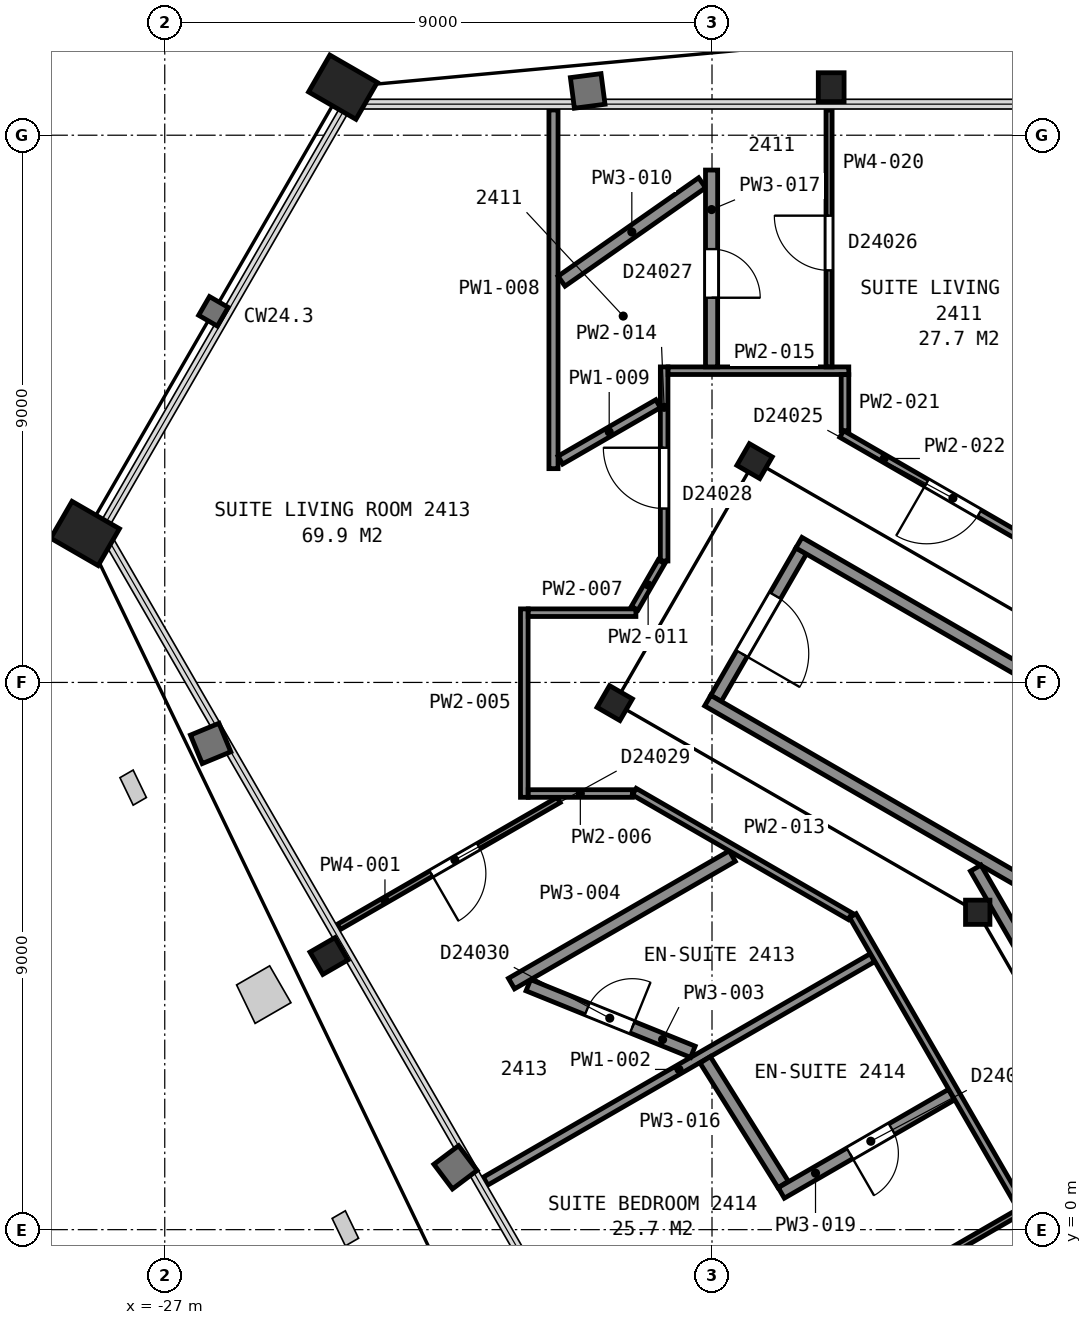
"""IFC4 building model, lengths in metres.
Left out: names, types, materials, properties, quantities, classifications, styles, units other than length and angle.
Written with IfcOpenShell. Run it as: python <this file> out.ifc"""

import sys

from ifc_helpers import new_model, si_unit, direction, frame, frame_2d, origin, origin_2d, place, context, subcontext, project, spatial, rectangle, hollow_rectangle, i_section, extrude, element, fill, save


model = new_model("IFC4")
c1 = context("Model", 3, precision=1e-05, world=origin(), true_north=direction((0.0, 1.0)))
c2 = subcontext(c1, "Body", "Model", "MODEL_VIEW")
j1 = project(units=[si_unit("LENGTHUNIT", "METRE"), si_unit("PLANEANGLEUNIT", "RADIAN")], contexts=[c1])
p1 = place(None, origin())
s1 = spatial("IfcSite", under=j1, at=p1, CompositionType="ELEMENT")
p2 = place(p1, origin())
s2 = spatial("IfcBuilding", under=s1, at=p2, CompositionType="ELEMENT")
p3 = place(p2, frame((0.0, 0.0, 103.6)))
s3 = spatial("IfcBuildingStorey", under=s2, at=p3, CompositionType="ELEMENT", Elevation=103.6)
p4 = place(p3, frame((-16.04, 18.79, 0.045), z_axis=(0.0, 0.0, 1.0), x_axis=(1.0, 0.0, 0.0)))
e1 = element("IfcColumn", 1, at=p4, inside=s3, PredefinedType="COLUMN", context=c2, shape_type="SweptSolid", body=[
    extrude(i_section(OverallWidth=0.424, OverallDepth=0.475, WebThickness=0.048, FlangeThickness=0.077, FilletRadius=0.015, at=origin_2d()), origin(), (0.0, 0.0, 1.0), 3.555),
])
for number, where, z_axis, x_axis in (
    (2, (-24.07, 18.79, 0.075), (0.0, 0.0, 1.0), (0.5, 0.866, 0.0)),
    (3, (-28.31, 11.45, 0.075), (0.0, 0.0, 1.0), (0.5, 0.866, 0.0)),
):
    element("IfcColumn", number, at=place(p3, frame(where, z_axis=z_axis, x_axis=x_axis)), inside=s3, PredefinedType="COLUMN", context=c2, shape_type="SweptSolid", body=[
        extrude(hollow_rectangle(XDim=0.7, YDim=0.9, WallThickness=0.065, at=origin_2d()), origin(), (0.0, 0.0, 1.0), 3.525),
    ])
p5 = place(p3, frame((-24.3, 4.5, 0.045), z_axis=(0.0, 0.0, 1.0), x_axis=(-0.5, 0.866025403784, 0.0)))
e4 = element("IfcColumn", 4, at=p5, inside=s3, PredefinedType="COLUMN", context=c2, shape_type="SweptSolid", body=[
    extrude(i_section(OverallWidth=0.424, OverallDepth=0.475, WebThickness=0.048, FlangeThickness=0.077, FilletRadius=0.015, at=origin_2d()), origin(), (0.0, 0.0, 1.0), 3.555),
])
for number, where, z_axis, x_axis in (
    (5, (-17.3, 12.64, 0.0), (0.0, 0.0, 1.0), (0.5, 0.866, 0.0)),
    (6, (-19.6, 8.66, 0.0), (0.0, 0.0, 1.0), (0.5, 0.866, 0.0)),
):
    element("IfcColumn", number, at=place(p3, frame(where, z_axis=z_axis, x_axis=x_axis)), inside=s3, PredefinedType="COLUMN", context=c2, shape_type="SweptSolid", body=[
        extrude(i_section(OverallWidth=0.411, OverallDepth=0.434, WebThickness=0.036, FlangeThickness=0.057, FilletRadius=0.015, at=origin_2d()), origin(), (0.0, 0.0, 1.0), 3.6),
    ])
p6 = place(p3, frame((-13.63, 5.22, 0.0), z_axis=(0.0, 0.0, 1.0), x_axis=(1.0, 0.0, 0.0)))
e7 = element("IfcColumn", 7, at=p6, inside=s3, PredefinedType="COLUMN", context=c2, shape_type="SweptSolid", body=[
    extrude(i_section(OverallWidth=0.401, OverallDepth=0.399, WebThickness=0.025, FlangeThickness=0.04, FilletRadius=0.015, at=origin_2d()), origin(), (0.0, 0.0, 1.0), 3.6),
])
p7 = place(p3, frame((-16.534, 11.162, 0.0), z_axis=(0.0, 0.0, 1.0), x_axis=(-0.49998411664, -0.866034573852, 0.0)))
e8 = element("IfcWall", 8, at=p7, inside=s3, PredefinedType="PARTITIONING", context=c2, shape_type="SweptSolid", body=[
    extrude(rectangle(XDim=2.8, YDim=0.2, at=frame_2d((1.4, 0.0))), origin(), (0.0, 0.0, 1.0), 3.35),
])
p8 = place(p7, frame((0.85, 0.0, 0.0)))
e9 = element("IfcOpeningElement", 9, at=p8, cuts=e8, PredefinedType="OPENING", context=c2, shape_type="SweptSolid", body=[
    extrude(rectangle(XDim=1.1, YDim=2.1, at=frame_2d((0.55, 1.05))), frame((0.0, 0.11, 0.0), z_axis=(0.0, -1.0, 0.0), x_axis=(1.0, 0.0, 0.0)), (0.0, 0.0, 1.0), 0.22),
])
for number, where, z_axis, x_axis in (
    (10, (-7.678, 2.701, 0.0), (0.0, 0.0, 1.0), (-0.866, 0.5, 0.0)),
    (11, (-6.178, 5.299, 0.0), (0.0, 0.0, 1.0), (-0.866, 0.5, 0.0)),
):
    element("IfcWall", number, at=place(p3, frame(where, z_axis=z_axis, x_axis=x_axis)), inside=s3, PredefinedType="PARTITIONING", context=c2, shape_type="SweptSolid", body=[
        extrude(rectangle(XDim=12.0, YDim=0.2, at=frame_2d((6.0, 0.0))), origin(), (0.0, 0.0, 1.0), 3.35),
    ])
p9 = place(p3, frame((-13.664, 5.946, 0.0), z_axis=(0.0, 0.0, 1.0), x_axis=(0.499994327219, -0.866028678941, 0.0)))
e12 = element("IfcWall", 12, at=p9, inside=s3, PredefinedType="PARTITIONING", context=c2, shape_type="SweptSolid", body=[
    extrude(rectangle(XDim=23.968, YDim=0.2, at=frame_2d((11.984, 0.0))), origin(), (0.0, 0.0, 1.0), 3.35),
])
p10 = place(p3, frame((-20.521, 7.067, 0.0), z_axis=(0.0, 0.0, 1.0), x_axis=(-0.866025950195, -0.499999053588, 0.0)))
e13 = element("IfcWall", 13, at=p10, inside=s3, PredefinedType="PARTITIONING", context=c2, shape_type="SweptSolid", body=[
    extrude(rectangle(XDim=4.177, YDim=0.1, at=frame_2d((2.088, 0.0))), origin(), (0.0, 0.0, 1.0), 2.613),
])
p11 = place(p10, frame((1.522, 0.0, 0.0)))
e14 = element("IfcOpeningElement", 14, at=p11, cuts=e13, PredefinedType="OPENING", context=c2, shape_type="SweptSolid", body=[
    extrude(rectangle(XDim=0.9, YDim=2.1, at=frame_2d((0.45, 1.05))), frame((0.0, 0.06, 0.0), z_axis=(0.0, -1.0, 0.0), x_axis=(1.0, 0.0, 0.0)), (0.0, 0.0, 1.0), 0.12),
])
p12 = place(p3, frame((-21.725, 0.798, 0.0), z_axis=(0.0, 0.0, 1.0), x_axis=(0.866003534372, 0.50003787702, 0.0)))
e15 = element("IfcWall", 15, at=p12, inside=s3, PredefinedType="PARTITIONING", context=c2, shape_type="SweptSolid", body=[
    extrude(rectangle(XDim=7.348, YDim=0.15, at=frame_2d((3.674, 0.0))), origin(), (0.0, 0.0, 1.0), 2.613),
])
p13 = place(p3, frame((-21.021, 4.02, 0.0), z_axis=(0.0, 0.0, 1.0), x_axis=(0.927010502524, -0.375035369278, 0.0)))
e16 = element("IfcWall", 16, at=p13, inside=s3, PredefinedType="PARTITIONING", context=c2, shape_type="SweptSolid", body=[
    extrude(rectangle(XDim=2.92, YDim=0.2, at=frame_2d((1.46, 0.0))), origin(), (0.0, 0.0, 1.0), 2.613),
])
p14 = place(p13, frame((1.045, 0.0, 0.0)))
e17 = element("IfcOpeningElement", 17, at=p14, cuts=e16, PredefinedType="OPENING", context=c2, shape_type="SweptSolid", body=[
    extrude(rectangle(XDim=0.8, YDim=2.1, at=frame_2d((0.4, 1.05))), frame((0.0, 0.11, 0.0), z_axis=(0.0, -1.0, 0.0), x_axis=(1.0, 0.0, 0.0)), (0.0, 0.0, 1.0), 0.22),
])
p15 = place(p3, frame((-21.298, 4.047, 0.0), z_axis=(0.0, 0.0, 1.0), x_axis=(0.865948008923, 0.500134027879, 0.0)))
e18 = element("IfcWall", 18, at=p15, inside=s3, PredefinedType="PARTITIONING", context=c2, shape_type="SweptSolid", body=[
    extrude(rectangle(XDim=4.193, YDim=0.2, at=frame_2d((2.097, 0.0))), origin(), (0.0, 0.0, 1.0), 2.613),
])
p16 = place(p3, frame((-21.087, 7.111, 0.0), z_axis=(0.0, 0.0, 1.0), x_axis=(0.0, 1.0, 0.0)))
e19 = element("IfcWall", 19, at=p16, inside=s3, PredefinedType="PARTITIONING", context=c2, shape_type="SweptSolid", body=[
    extrude(rectangle(XDim=3.099, YDim=0.125, at=frame_2d((1.549, 0.0))), origin(), (0.0, 0.0, 1.0), 2.613),
])
p17 = place(p3, frame((-21.022, 7.173, 0.0), z_axis=(0.0, 0.0, 1.0), x_axis=(1.0, 0.0, 0.0)))
e20 = element("IfcWall", 20, at=p17, inside=s3, PredefinedType="PARTITIONING", context=c2, shape_type="SweptSolid", body=[
    extrude(rectangle(XDim=1.713, YDim=0.125, at=frame_2d((0.856, 0.0))), origin(), (0.0, 0.0, 1.0), 2.613),
])
p18 = place(p3, frame((-21.022, 10.147, 0.0), z_axis=(0.0, 0.0, 1.0), x_axis=(1.0, 0.0, 0.0)))
e21 = element("IfcWall", 21, at=p18, inside=s3, PredefinedType="PARTITIONING", context=c2, shape_type="SweptSolid", body=[
    extrude(rectangle(XDim=1.771, YDim=0.125, at=frame_2d((0.885, 0.0))), origin(), (0.0, 0.0, 1.0), 2.613),
])
p19 = place(p3, frame((-20.607, 12.516, 0.0), z_axis=(0.0, 0.0, 1.0), x_axis=(0.0, 1.0, 0.0)))
e22 = element("IfcWall", 22, at=p19, inside=s3, PredefinedType="PARTITIONING", context=c2, shape_type="SweptSolid", body=[
    extrude(rectangle(XDim=5.899, YDim=0.15, at=frame_2d((2.949, 0.0))), origin(), (0.0, 0.0, 1.0), 2.613),
])
p20 = place(p3, frame((-20.494, 12.656, 0.0), z_axis=(0.0, 0.0, 1.0), x_axis=(0.865984062371, 0.500071598593, 0.0)))
e23 = element("IfcWall", 23, at=p20, inside=s3, PredefinedType="PARTITIONING", context=c2, shape_type="SweptSolid", body=[
    extrude(rectangle(XDim=1.856, YDim=0.15, at=frame_2d((0.928, 0.0))), origin(), (0.0, 0.0, 1.0), 2.613),
])
p21 = place(p3, frame((-20.475, 15.6, 0.0), z_axis=(0.0, 0.0, 1.0), x_axis=(0.819231920519, 0.573462344363, 0.0)))
e24 = element("IfcWall", 24, at=p21, inside=s3, PredefinedType="PARTITIONING", context=c2, shape_type="SweptSolid", body=[
    extrude(rectangle(XDim=2.822, YDim=0.2, at=frame_2d((1.411, 0.0))), origin(), (0.0, 0.0, 1.0), 2.613),
])
p22 = place(p3, frame((-19.271, 10.221, 0.0), z_axis=(0.0, 0.0, 1.0), x_axis=(0.499881837328, 0.866093614288, 0.0)))
e25 = element("IfcWall", 25, at=p22, inside=s3, PredefinedType="PARTITIONING", context=c2, shape_type="SweptSolid", body=[
    extrude(rectangle(XDim=0.884, YDim=0.125, at=frame_2d((0.442, 0.0))), origin(), (0.0, 0.0, 1.0), 2.613),
])
p23 = place(p3, frame((-19.311, -3.382, 0.0), z_axis=(0.0, 0.0, 1.0), x_axis=(0.865995225926, 0.500052265941, 0.0)))
e26 = element("IfcWall", 26, at=p23, inside=s3, PredefinedType="PARTITIONING", context=c2, shape_type="SweptSolid", body=[
    extrude(rectangle(XDim=7.347, YDim=0.1, at=frame_2d((3.674, 0.0))), origin(), (0.0, 0.0, 1.0), 2.613),
])
p24 = place(p23, frame((3.303, 0.0, 0.0)))
e27 = element("IfcOpeningElement", 27, at=p24, cuts=e26, PredefinedType="OPENING", context=c2, shape_type="SweptSolid", body=[
    extrude(rectangle(XDim=0.9, YDim=2.1, at=frame_2d((0.45, 1.05))), frame((0.0, 0.06, 0.0), z_axis=(0.0, -1.0, 0.0), x_axis=(1.0, 0.0, 0.0)), (0.0, 0.0, 1.0), 0.12),
])
p25 = place(p3, frame((-19.278, 7.204, 0.0), z_axis=(0.0, 0.0, 1.0), x_axis=(0.865992261418, -0.50005739987, 0.0)))
e28 = element("IfcWall", 28, at=p25, inside=s3, PredefinedType="PARTITIONING", context=c2, shape_type="SweptSolid", body=[
    extrude(rectangle(XDim=4.101, YDim=0.125, at=frame_2d((2.051, 0.0))), origin(), (0.0, 0.0, 1.0), 2.613),
])
p26 = place(p3, frame((-18.787, 10.998, 0.0), z_axis=(0.0, 0.0, 1.0), x_axis=(0.0, 1.0, 0.0)))
e29 = element("IfcWall", 29, at=p26, inside=s3, PredefinedType="PARTITIONING", context=c2, shape_type="SweptSolid", body=[
    extrude(rectangle(XDim=3.192, YDim=0.125, at=frame_2d((1.596, 0.0))), origin(), (0.0, 0.0, 1.0), 2.613),
])
p27 = place(p26, frame((0.863, 0.0, 0.0)))
e30 = element("IfcOpeningElement", 30, at=p27, cuts=e29, PredefinedType="OPENING", context=c2, shape_type="SweptSolid", body=[
    extrude(rectangle(XDim=1.0, YDim=2.1, at=frame_2d((0.5, 1.05))), frame((0.0, 0.073, 0.0), z_axis=(0.0, -1.0, 0.0), x_axis=(1.0, 0.0, 0.0)), (0.0, 0.0, 1.0), 0.145),
])
p28 = place(p3, frame((-18.722, 14.127, 0.0), z_axis=(0.0, 0.0, 1.0), x_axis=(1.0, 0.0, 0.0)))
e31 = element("IfcWall", 31, at=p28, inside=s3, PredefinedType="PARTITIONING", context=c2, shape_type="SweptSolid", body=[
    extrude(rectangle(XDim=2.971, YDim=0.125, at=frame_2d((1.486, 0.0))), origin(), (0.0, 0.0, 1.0), 2.613),
])
p29 = place(p3, frame((-18.112, 2.793, 0.0), z_axis=(0.0, 0.0, 1.0), x_axis=(0.530334606404, -0.847788420097, 0.0)))
e32 = element("IfcWall", 32, at=p29, inside=s3, PredefinedType="PARTITIONING", context=c2, shape_type="SweptSolid", body=[
    extrude(rectangle(XDim=2.419, YDim=0.2, at=frame_2d((1.209, 0.0))), origin(), (0.0, 0.0, 1.0), 2.613),
])
p30 = place(p3, frame((-18.007, 14.189, 0.0), z_axis=(0.0, 0.0, 1.0), x_axis=(0.0, 1.0, 0.0)))
e33 = element("IfcWall", 33, at=p30, inside=s3, PredefinedType="PARTITIONING", context=c2, shape_type="SweptSolid", body=[
    extrude(rectangle(XDim=3.238, YDim=0.2, at=frame_2d((1.619, 0.0))), origin(), (0.0, 0.0, 1.0), 2.613),
])
p31 = place(p30, frame((1.137, 0.0, 0.0)))
e34 = element("IfcOpeningElement", 34, at=p31, cuts=e33, PredefinedType="OPENING", context=c2, shape_type="SweptSolid", body=[
    extrude(rectangle(XDim=0.8, YDim=2.1, at=frame_2d((0.4, 1.05))), frame((0.0, 0.11, 0.0), z_axis=(0.0, -1.0, 0.0), x_axis=(1.0, 0.0, 0.0)), (0.0, 0.0, 1.0), 0.22),
])
p32 = place(p3, frame((-16.861, 0.604, 0.0), z_axis=(0.0, 0.0, 1.0), x_axis=(0.866003189247, 0.500038474733, 0.0)))
e35 = element("IfcWall", 35, at=p32, inside=s3, PredefinedType="PARTITIONING", context=c2, shape_type="SweptSolid", body=[
    extrude(rectangle(XDim=3.232, YDim=0.2, at=frame_2d((1.616, 0.0))), origin(), (0.0, 0.0, 1.0), 2.613),
])
p33 = place(p32, frame((1.3, 0.0, 0.0)))
e36 = element("IfcOpeningElement", 36, at=p33, cuts=e35, PredefinedType="OPENING", context=c2, shape_type="SweptSolid", body=[
    extrude(rectangle(XDim=0.8, YDim=2.1, at=frame_2d((0.4, 1.05))), frame((0.0, 0.11, 0.0), z_axis=(0.0, -1.0, 0.0), x_axis=(1.0, 0.0, 0.0)), (0.0, 0.0, 1.0), 0.22),
])
p34 = place(p3, frame((-16.075, 14.189, 0.0), z_axis=(0.0, 0.0, 1.0), x_axis=(0.0, 1.0, 0.0)))
e37 = element("IfcWall", 37, at=p34, inside=s3, PredefinedType="PARTITIONING", context=c2, shape_type="SweptSolid", body=[
    extrude(rectangle(XDim=4.226, YDim=0.1, at=frame_2d((2.113, 0.0))), origin(), (0.0, 0.0, 1.0), 2.613),
])
p35 = place(p34, frame((1.587, 0.0, 0.0)))
e38 = element("IfcOpeningElement", 38, at=p35, cuts=e37, PredefinedType="OPENING", context=c2, shape_type="SweptSolid", body=[
    extrude(rectangle(XDim=0.9, YDim=2.1, at=frame_2d((0.45, 1.05))), frame((0.0, 0.06, 0.0), z_axis=(0.0, -1.0, 0.0), x_axis=(1.0, 0.0, 0.0)), (0.0, 0.0, 1.0), 0.12),
])
p36 = place(p3, frame((-15.813, 13.14, 0.0), z_axis=(0.0, 0.0, 1.0), x_axis=(0.0, 1.0, 0.0)))
e39 = element("IfcWall", 39, at=p36, inside=s3, PredefinedType="PARTITIONING", context=c2, shape_type="SweptSolid", body=[
    extrude(rectangle(XDim=0.922, YDim=0.125, at=frame_2d((0.461, 0.0))), origin(), (0.0, 0.0, 1.0), 2.613),
])
p37 = place(p3, frame((-15.867, 13.086, 0.0), z_axis=(0.0, 0.0, 1.0), x_axis=(0.866070231021, -0.499922348909, 0.0)))
e40 = element("IfcWall", 40, at=p37, inside=s3, PredefinedType="PARTITIONING", context=c2, shape_type="SweptSolid", body=[
    extrude(rectangle(XDim=4.088, YDim=0.125, at=frame_2d((2.044, 0.0))), origin(), (0.0, 0.0, 1.0), 2.613),
])
p38 = place(p37, frame((1.613, 0.0, 0.0)))
e41 = element("IfcOpeningElement", 41, at=p38, cuts=e40, PredefinedType="OPENING", context=c2, shape_type="SweptSolid", body=[
    extrude(rectangle(XDim=1.0, YDim=2.1, at=frame_2d((0.5, 1.05))), frame((0.0, 0.073, 0.0), z_axis=(0.0, -1.0, 0.0), x_axis=(1.0, 0.0, 0.0)), (0.0, 0.0, 1.0), 0.145),
])
p39 = place(p3, frame((-3.756, -15.494, 0.0), z_axis=(0.0, 0.0, 1.0), x_axis=(-0.500027787016, 0.866009360349, 0.0)))
e42 = element("IfcWall", 42, at=p39, inside=s3, PredefinedType="PARTITIONING", context=c2, shape_type="SweptSolid", body=[
    extrude(rectangle(XDim=23.856, YDim=0.125, at=frame_2d((11.928, 0.0))), origin(), (0.0, 0.0, 1.0), 2.613),
])
p40 = place(p39, frame((15.368, 0.0, 0.0)))
e43 = element("IfcOpeningElement", 43, at=p40, cuts=e42, PredefinedType="OPENING", context=c2, shape_type="SweptSolid", body=[
    extrude(rectangle(XDim=1.0, YDim=2.1, at=frame_2d((0.5, 1.05))), frame((0.0, 0.073, 0.0), z_axis=(0.0, -1.0, 0.0), x_axis=(1.0, 0.0, 0.0)), (0.0, 0.0, 1.0), 0.145),
])
p41 = place(p39, frame((10.54, 0.0, 0.0)))
e44 = element("IfcOpeningElement", 44, at=p41, cuts=e42, PredefinedType="OPENING", context=c2, shape_type="SweptSolid", body=[
    extrude(rectangle(XDim=1.0, YDim=2.1, at=frame_2d((0.5, 1.05))), frame((0.0, 0.073, 0.0), z_axis=(0.0, -1.0, 0.0), x_axis=(1.0, 0.0, 0.0)), (0.0, 0.0, 1.0), 0.145),
])
p42 = place(p8, origin())
e45 = element("IfcDoor", 45, at=p42, inside=s3, OperationType="SINGLE_SWING_RIGHT", PredefinedType="DOOR", context=c2, shape_type="SweptSolid", body=[
    extrude(rectangle(XDim=1.1, YDim=2.1, at=frame_2d((0.55, 1.05))), frame((0.0, 0.025, 0.0), z_axis=(0.0, -1.0, 0.0), x_axis=(1.0, 0.0, 0.0)), (0.0, 0.0, 1.0), 0.05),
])
fill(e9, e45)
p43 = place(p11, origin())
e46 = element("IfcDoor", 46, at=p43, inside=s3, OperationType="SINGLE_SWING_RIGHT", PredefinedType="DOOR", context=c2, shape_type="SweptSolid", body=[
    extrude(rectangle(XDim=0.9, YDim=2.1, at=frame_2d((0.45, 1.05))), frame((0.0, 0.025, 0.0), z_axis=(0.0, -1.0, 0.0), x_axis=(1.0, 0.0, 0.0)), (0.0, 0.0, 1.0), 0.05),
])
fill(e14, e46)
p44 = place(p14, origin())
e47 = element("IfcDoor", 47, at=p44, inside=s3, OperationType="SINGLE_SWING_RIGHT", PredefinedType="DOOR", context=c2, shape_type="SweptSolid", body=[
    extrude(rectangle(XDim=0.8, YDim=2.1, at=frame_2d((0.4, 1.05))), frame((0.0, 0.025, 0.0), z_axis=(0.0, -1.0, 0.0), x_axis=(1.0, 0.0, 0.0)), (0.0, 0.0, 1.0), 0.05),
])
fill(e17, e47)
p45 = place(p27, origin())
e48 = element("IfcDoor", 48, at=p45, inside=s3, OperationType="SINGLE_SWING_RIGHT", PredefinedType="DOOR", context=c2, shape_type="SweptSolid", body=[
    extrude(rectangle(XDim=1.0, YDim=2.1, at=frame_2d((0.5, 1.05))), frame((0.0, 0.025, 0.0), z_axis=(0.0, -1.0, 0.0), x_axis=(1.0, 0.0, 0.0)), (0.0, 0.0, 1.0), 0.05),
])
fill(e30, e48)
p46 = place(p31, origin())
e49 = element("IfcDoor", 49, at=p46, inside=s3, OperationType="SINGLE_SWING_LEFT", PredefinedType="DOOR", context=c2, shape_type="SweptSolid", body=[
    extrude(rectangle(XDim=0.8, YDim=2.1, at=frame_2d((0.4, 1.05))), frame((0.0, 0.025, 0.0), z_axis=(0.0, -1.0, 0.0), x_axis=(1.0, 0.0, 0.0)), (0.0, 0.0, 1.0), 0.05),
])
fill(e34, e49)
p47 = place(p33, origin())
e50 = element("IfcDoor", 50, at=p47, inside=s3, OperationType="SINGLE_SWING_LEFT", PredefinedType="DOOR", context=c2, shape_type="SweptSolid", body=[
    extrude(rectangle(XDim=0.8, YDim=2.1, at=frame_2d((0.4, 1.05))), frame((0.0, 0.025, 0.0), z_axis=(0.0, -1.0, 0.0), x_axis=(1.0, 0.0, 0.0)), (0.0, 0.0, 1.0), 0.05),
])
fill(e36, e50)
p48 = place(p35, origin())
e51 = element("IfcDoor", 51, at=p48, inside=s3, OperationType="SINGLE_SWING_RIGHT", PredefinedType="DOOR", context=c2, shape_type="SweptSolid", body=[
    extrude(rectangle(XDim=0.9, YDim=2.1, at=frame_2d((0.45, 1.05))), frame((0.0, 0.025, 0.0), z_axis=(0.0, -1.0, 0.0), x_axis=(1.0, 0.0, 0.0)), (0.0, 0.0, 1.0), 0.05),
])
fill(e38, e51)
p49 = place(p38, origin())
e52 = element("IfcDoor", 52, at=p49, inside=s3, OperationType="SINGLE_SWING_LEFT", PredefinedType="DOOR", context=c2, shape_type="SweptSolid", body=[
    extrude(rectangle(XDim=1.0, YDim=2.1, at=frame_2d((0.5, 1.05))), frame((0.0, 0.025, 0.0), z_axis=(0.0, -1.0, 0.0), x_axis=(1.0, 0.0, 0.0)), (0.0, 0.0, 1.0), 0.05),
])
fill(e41, e52)
save(model, sys.argv[1])
